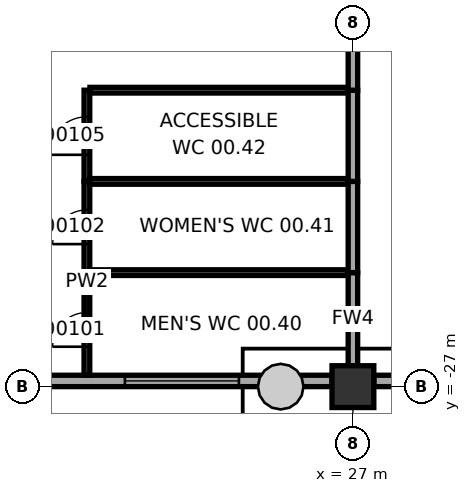
"""IFC4 building model, lengths in metres.
Left out: names, types, materials, properties, quantities, classifications, styles, units other than length and angle.
Written with IfcOpenShell. Run it as: python <this file> out.ifc"""

import sys

from ifc_helpers import new_model, si_unit, direction, frame, frame_2d, origin, origin_2d, place, context, subcontext, project, spatial, rectangle, extrude, element, fill, save


model = new_model("IFC4")
c1 = context("Model", 3, precision=1e-05, world=origin(), true_north=direction((0.0, 1.0)))
c2 = subcontext(c1, "Body", "Model", "MODEL_VIEW")
j1 = project(units=[si_unit("LENGTHUNIT", "METRE"), si_unit("PLANEANGLEUNIT", "RADIAN")], contexts=[c1])
p1 = place(None, origin())
s1 = spatial("IfcSite", under=j1, at=p1, CompositionType="ELEMENT")
p2 = place(p1, origin())
s2 = spatial("IfcBuilding", under=s1, at=p2, CompositionType="ELEMENT")
p3 = place(p2, origin())
s3 = spatial("IfcBuildingStorey", under=s2, at=p3, CompositionType="ELEMENT", Elevation=0.0)
p4 = place(p3, frame((27.0, -27.0, -0.3), z_axis=(0.0, 0.0, 1.0), x_axis=(1.0, 0.0, 0.0)))
e1 = element("IfcColumn", 1, at=p4, inside=s3, PredefinedType="COLUMN", context=c2, shape_type="SweptSolid", body=[
    extrude(rectangle(XDim=1.1, YDim=1.1, at=origin_2d()), origin(), (0.0, 0.0, 1.0), 7.8),
])
p5 = place(p3, frame((9.55, -26.85, 0.0), z_axis=(0.0, 0.0, 1.0), x_axis=(1.0, 0.0, 0.0)))
e2 = element("IfcWall", 2, at=p5, inside=s3, PredefinedType="STANDARD", context=c2, shape_type="SweptSolid", body=[
    extrude(rectangle(XDim=16.9, YDim=0.3, at=frame_2d((8.45, 0.0))), origin(), (0.0, 0.0, 1.0), 6.0),
])
p6 = place(p5, frame((2.45, 0.0, 4.7)))
e3 = element("IfcOpeningElement", 3, at=p6, cuts=e2, PredefinedType="OPENING", context=c2, shape_type="SweptSolid", body=[
    extrude(rectangle(XDim=3.0, YDim=1.3, at=frame_2d((1.5, 0.65))), frame((0.0, 0.16, 0.0), z_axis=(0.0, -1.0, 0.0), x_axis=(1.0, 0.0, 0.0)), (0.0, 0.0, 1.0), 0.32),
])
p7 = place(p5, frame((11.45, 0.0, 4.7)))
e4 = element("IfcOpeningElement", 4, at=p7, cuts=e2, PredefinedType="OPENING", context=c2, shape_type="SweptSolid", body=[
    extrude(rectangle(XDim=3.0, YDim=1.3, at=frame_2d((1.5, 0.65))), frame((0.0, 0.16, 0.0), z_axis=(0.0, -1.0, 0.0), x_axis=(1.0, 0.0, 0.0)), (0.0, 0.0, 1.0), 0.32),
])
p8 = place(p5, frame((1.8, 0.0, 0.0)))
e5 = element("IfcOpeningElement", 5, at=p8, cuts=e2, PredefinedType="OPENING", context=c2, shape_type="SweptSolid", body=[
    extrude(rectangle(XDim=1.3, YDim=2.4, at=frame_2d((0.65, 1.2))), frame((0.0, 0.16, 0.0), z_axis=(0.0, -1.0, 0.0), x_axis=(1.0, 0.0, 0.0)), (0.0, 0.0, 1.0), 0.32),
])
p9 = place(p5, frame((5.8, 0.0, 0.0)))
e6 = element("IfcOpeningElement", 6, at=p9, cuts=e2, PredefinedType="OPENING", context=c2, shape_type="SweptSolid", body=[
    extrude(rectangle(XDim=1.3, YDim=2.4, at=frame_2d((0.65, 1.2))), frame((0.0, 0.16, 0.0), z_axis=(0.0, -1.0, 0.0), x_axis=(1.0, 0.0, 0.0)), (0.0, 0.0, 1.0), 0.32),
])
p10 = place(p3, frame((27.55, -26.85, 0.0), z_axis=(0.0, 0.0, 1.0), x_axis=(1.0, 0.0, 0.0)))
e7 = element("IfcWall", 7, at=p10, inside=s3, PredefinedType="STANDARD", context=c2, shape_type="SweptSolid", body=[
    extrude(rectangle(XDim=16.9, YDim=0.3, at=frame_2d((8.45, 0.0))), origin(), (0.0, 0.0, 1.0), 6.0),
])
p11 = place(p10, frame((2.45, 0.0, 4.7)))
e8 = element("IfcOpeningElement", 8, at=p11, cuts=e7, PredefinedType="OPENING", context=c2, shape_type="SweptSolid", body=[
    extrude(rectangle(XDim=3.0, YDim=1.3, at=frame_2d((1.5, 0.65))), frame((0.0, 0.16, 0.0), z_axis=(0.0, -1.0, 0.0), x_axis=(1.0, 0.0, 0.0)), (0.0, 0.0, 1.0), 0.32),
])
p12 = place(p10, frame((11.45, 0.0, 4.7)))
e9 = element("IfcOpeningElement", 9, at=p12, cuts=e7, PredefinedType="OPENING", context=c2, shape_type="SweptSolid", body=[
    extrude(rectangle(XDim=3.0, YDim=1.3, at=frame_2d((1.5, 0.65))), frame((0.0, 0.16, 0.0), z_axis=(0.0, -1.0, 0.0), x_axis=(1.0, 0.0, 0.0)), (0.0, 0.0, 1.0), 0.32),
])
p13 = place(p10, frame((2.5, 0.0, 0.0)))
e10 = element("IfcOpeningElement", 10, at=p13, cuts=e7, PredefinedType="OPENING", context=c2, shape_type="SweptSolid", body=[
    extrude(rectangle(XDim=1.3, YDim=2.4, at=frame_2d((0.65, 1.2))), frame((0.0, 0.16, 0.0), z_axis=(0.0, -1.0, 0.0), x_axis=(1.0, 0.0, 0.0)), (0.0, 0.0, 1.0), 0.32),
])
p14 = place(p10, frame((6.5, 0.0, 0.0)))
e11 = element("IfcOpeningElement", 11, at=p14, cuts=e7, PredefinedType="OPENING", context=c2, shape_type="SweptSolid", body=[
    extrude(rectangle(XDim=2.1, YDim=2.4, at=frame_2d((1.05, 1.2))), frame((0.0, 0.16, 0.0), z_axis=(0.0, -1.0, 0.0), x_axis=(1.0, 0.0, 0.0)), (0.0, 0.0, 1.0), 0.32),
])
p15 = place(p3, frame((20.0, -26.7, 0.0), z_axis=(0.0, 0.0, 1.0), x_axis=(0.0, 1.0, 0.0)))
e12 = element("IfcWall", 12, at=p15, inside=s3, PredefinedType="PARTITIONING", context=c2, shape_type="SweptSolid", body=[
    extrude(rectangle(XDim=2.7, YDim=0.15, at=frame_2d((1.35, 0.0))), origin(), (0.0, 0.0, 1.0), 7.2),
])
p16 = place(p15, frame((0.75, 0.0, 0.0)))
e13 = element("IfcOpeningElement", 13, at=p16, cuts=e12, PredefinedType="OPENING", context=c2, shape_type="SweptSolid", body=[
    extrude(rectangle(XDim=0.9, YDim=2.1, at=frame_2d((0.45, 1.05))), frame((0.0, 0.085, 0.0), z_axis=(0.0, -1.0, 0.0), x_axis=(1.0, 0.0, 0.0)), (0.0, 0.0, 1.0), 0.17),
])
p17 = place(p3, frame((27.0, -26.45, 0.0), z_axis=(0.0, 0.0, 1.0), x_axis=(0.0, 1.0, 0.0)))
e14 = element("IfcWall", 14, at=p17, inside=s3, PredefinedType="SOLIDWALL", context=c2, shape_type="SweptSolid", body=[
    extrude(rectangle(XDim=2.45, YDim=0.25, at=frame_2d((1.225, 0.0))), origin(), (0.0, 0.0, 1.0), 6.0),
])
p18 = place(p3, frame((20.0, -24.0, 0.0), z_axis=(0.0, 0.0, 1.0), x_axis=(0.0, 1.0, 0.0)))
e15 = element("IfcWall", 15, at=p18, inside=s3, PredefinedType="PARTITIONING", context=c2, shape_type="SweptSolid", body=[
    extrude(rectangle(XDim=2.4, YDim=0.15, at=frame_2d((1.2, 0.0))), origin(), (0.0, 0.0, 1.0), 7.2),
])
p19 = place(p18, frame((0.75, 0.0, 0.0)))
e16 = element("IfcOpeningElement", 16, at=p19, cuts=e15, PredefinedType="OPENING", context=c2, shape_type="SweptSolid", body=[
    extrude(rectangle(XDim=0.9, YDim=2.1, at=frame_2d((0.45, 1.05))), frame((0.0, 0.085, 0.0), z_axis=(0.0, -1.0, 0.0), x_axis=(1.0, 0.0, 0.0)), (0.0, 0.0, 1.0), 0.17),
])
p20 = place(p3, frame((20.08, -24.0, 0.0), z_axis=(0.0, 0.0, 1.0), x_axis=(1.0, 0.0, 0.0)))
e17 = element("IfcWall", 17, at=p20, inside=s3, PredefinedType="PARTITIONING", context=c2, shape_type="SweptSolid", body=[
    extrude(rectangle(XDim=6.78, YDim=0.15, at=frame_2d((3.39, 0.0))), origin(), (0.0, 0.0, 1.0), 7.2),
])
p21 = place(p3, frame((27.0, -24.0, 0.0), z_axis=(0.0, 0.0, 1.0), x_axis=(0.0, 1.0, 0.0)))
e18 = element("IfcWall", 18, at=p21, inside=s3, PredefinedType="SOLIDWALL", context=c2, shape_type="SweptSolid", body=[
    extrude(rectangle(XDim=2.4, YDim=0.25, at=frame_2d((1.2, 0.0))), origin(), (0.0, 0.0, 1.0), 6.0),
])
p22 = place(p3, frame((20.0, -21.6, 0.0), z_axis=(0.0, 0.0, 1.0), x_axis=(0.0, 1.0, 0.0)))
e19 = element("IfcWall", 19, at=p22, inside=s3, PredefinedType="PARTITIONING", context=c2, shape_type="SweptSolid", body=[
    extrude(rectangle(XDim=2.4, YDim=0.15, at=frame_2d((1.2, 0.0))), origin(), (0.0, 0.0, 1.0), 7.2),
])
p23 = place(p22, frame((0.7, 0.0, 0.0)))
e20 = element("IfcOpeningElement", 20, at=p23, cuts=e19, PredefinedType="OPENING", context=c2, shape_type="SweptSolid", body=[
    extrude(rectangle(XDim=1.0, YDim=2.1, at=frame_2d((0.5, 1.05))), frame((0.0, 0.085, 0.0), z_axis=(0.0, -1.0, 0.0), x_axis=(1.0, 0.0, 0.0)), (0.0, 0.0, 1.0), 0.17),
])
p24 = place(p3, frame((20.08, -21.6, 0.0), z_axis=(0.0, 0.0, 1.0), x_axis=(1.0, 0.0, 0.0)))
e21 = element("IfcWall", 21, at=p24, inside=s3, PredefinedType="PARTITIONING", context=c2, shape_type="SweptSolid", body=[
    extrude(rectangle(XDim=6.78, YDim=0.15, at=frame_2d((3.39, 0.0))), origin(), (0.0, 0.0, 1.0), 7.2),
])
p25 = place(p3, frame((27.0, -21.6, 0.0), z_axis=(0.0, 0.0, 1.0), x_axis=(0.0, 1.0, 0.0)))
e22 = element("IfcWall", 22, at=p25, inside=s3, PredefinedType="SOLIDWALL", context=c2, shape_type="SweptSolid", body=[
    extrude(rectangle(XDim=2.4, YDim=0.25, at=frame_2d((1.2, 0.0))), origin(), (0.0, 0.0, 1.0), 6.0),
])
p26 = place(p3, frame((20.08, -19.2, 0.0), z_axis=(0.0, 0.0, 1.0), x_axis=(1.0, 0.0, 0.0)))
e23 = element("IfcWall", 23, at=p26, inside=s3, PredefinedType="PARTITIONING", context=c2, shape_type="SweptSolid", body=[
    extrude(rectangle(XDim=6.78, YDim=0.15, at=frame_2d((3.39, 0.0))), origin(), (0.0, 0.0, 1.0), 7.2),
])
p27 = place(p3, frame((27.0, -19.2, 0.0), z_axis=(0.0, 0.0, 1.0), x_axis=(0.0, 1.0, 0.0)))
e24 = element("IfcWall", 24, at=p27, inside=s3, PredefinedType="SOLIDWALL", context=c2, shape_type="SweptSolid", body=[
    extrude(rectangle(XDim=6.7, YDim=0.25, at=frame_2d((3.35, 0.0))), origin(), (0.0, 0.0, 1.0), 6.0),
])
p28 = place(p27, frame((3.0, 0.0, 0.0)))
e25 = element("IfcOpeningElement", 25, at=p28, cuts=e24, PredefinedType="OPENING", context=c2, shape_type="SweptSolid", body=[
    extrude(rectangle(XDim=2.4, YDim=2.4, at=frame_2d((1.2, 1.2))), frame((0.0, 0.135, 0.0), z_axis=(0.0, -1.0, 0.0), x_axis=(1.0, 0.0, 0.0)), (0.0, 0.0, 1.0), 0.27),
])
p29 = place(p7, origin())
e26 = element("IfcWindow", 26, at=p29, inside=s3, PartitioningType="SINGLE_PANEL", PredefinedType="WINDOW", context=c2, shape_type="SweptSolid", body=[
    extrude(rectangle(XDim=3.0, YDim=1.3, at=frame_2d((1.5, 0.65))), frame((0.0, 0.03, 0.0), z_axis=(0.0, -1.0, 0.0), x_axis=(1.0, 0.0, 0.0)), (0.0, 0.0, 1.0), 0.06),
])
fill(e4, e26)
p30 = place(p16, origin())
e27 = element("IfcDoor", 27, at=p30, inside=s3, OperationType="SINGLE_SWING_LEFT", PredefinedType="DOOR", context=c2, shape_type="SweptSolid", body=[
    extrude(rectangle(XDim=0.9, YDim=2.1, at=frame_2d((0.45, 1.05))), frame((0.0, 0.025, 0.0), z_axis=(0.0, -1.0, 0.0), x_axis=(1.0, 0.0, 0.0)), (0.0, 0.0, 1.0), 0.05),
])
fill(e13, e27)
p31 = place(p19, origin())
e28 = element("IfcDoor", 28, at=p31, inside=s3, OperationType="SINGLE_SWING_LEFT", PredefinedType="DOOR", context=c2, shape_type="SweptSolid", body=[
    extrude(rectangle(XDim=0.9, YDim=2.1, at=frame_2d((0.45, 1.05))), frame((0.0, 0.025, 0.0), z_axis=(0.0, -1.0, 0.0), x_axis=(1.0, 0.0, 0.0)), (0.0, 0.0, 1.0), 0.05),
])
fill(e16, e28)
p32 = place(p23, origin())
e29 = element("IfcDoor", 29, at=p32, inside=s3, OperationType="SINGLE_SWING_LEFT", PredefinedType="DOOR", context=c2, shape_type="SweptSolid", body=[
    extrude(rectangle(XDim=1.0, YDim=2.1, at=frame_2d((0.5, 1.05))), frame((0.0, 0.025, 0.0), z_axis=(0.0, -1.0, 0.0), x_axis=(1.0, 0.0, 0.0)), (0.0, 0.0, 1.0), 0.05),
])
fill(e20, e29)
save(model, sys.argv[1])
